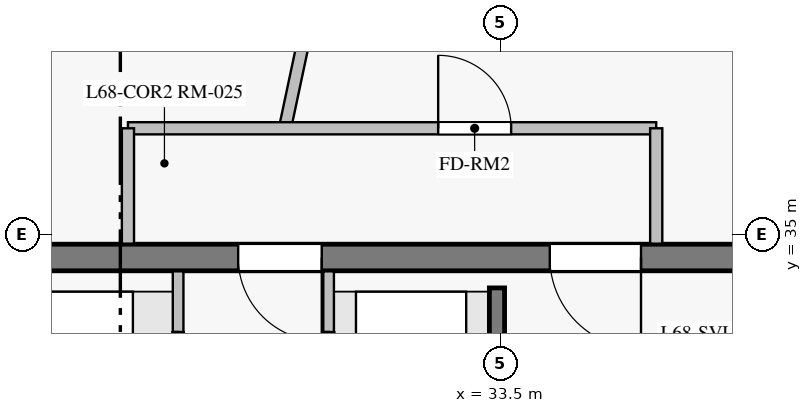
"""IFC4 building model, lengths in metres.
Left out: names, types, materials, properties, quantities, classifications, styles, units other than length and angle.
Written with IfcOpenShell. Run it as: python <this file> out.ifc"""

import sys

from ifc_helpers import new_model, si_unit, direction, frame, frame_2d, origin, origin_with_axes, place, context, subcontext, project, spatial, rectangle, extrude, source, transform, mapped, element, fill, save


model = new_model("IFC4")
c1 = context("Model", 3, precision=1e-05, world=origin(), true_north=direction((0.0, 1.0)))
c2 = subcontext(c1, "Body", "Model", "MODEL_VIEW")
j1 = project(units=[si_unit("LENGTHUNIT", "METRE"), si_unit("PLANEANGLEUNIT", "RADIAN")], contexts=[c1])
p1 = place(None, origin())
s1 = spatial("IfcSite", under=j1, at=p1, CompositionType="ELEMENT")
p2 = place(p1, origin())
s2 = spatial("IfcBuilding", under=s1, at=p2, CompositionType="ELEMENT")
p3 = place(p2, frame((0.0, 0.0, 232.15)))
s3 = spatial("IfcBuildingStorey", under=s2, at=p3, CompositionType="ELEMENT", Elevation=232.15)
p4 = place(p3, frame((37.5, 34.7, 0.0), z_axis=(0.0, 0.0, 1.0), x_axis=(-1.0, 0.0, 0.0)))
e1 = element("IfcWall", 1, at=p4, inside=s3, PredefinedType="SHEAR", context=c2, shape_type="SweptSolid", body=[
    extrude(rectangle(XDim=10.95, YDim=0.35, at=frame_2d((5.475, 0.0))), origin(), (0.0, 0.0, 1.0), 2.85),
])
p5 = place(p4, frame((2.15, 0.0, 0.0)))
e2 = element("IfcOpeningElement", 2, at=p5, cuts=e1, PredefinedType="OPENING", context=c2, shape_type="SweptSolid", body=[
    extrude(rectangle(XDim=1.2, YDim=2.15, at=frame_2d((0.6, 1.075))), frame((0.0, 0.185, 0.0), z_axis=(0.0, -1.0, 0.0), x_axis=(1.0, 0.0, 0.0)), (0.0, 0.0, 1.0), 0.37),
])
p6 = place(p4, frame((6.35, 0.0, 0.0)))
e3 = element("IfcOpeningElement", 3, at=p6, cuts=e1, PredefinedType="OPENING", context=c2, shape_type="SweptSolid", body=[
    extrude(rectangle(XDim=1.1, YDim=2.15, at=frame_2d((0.55, 1.075))), frame((0.0, 0.185, 0.0), z_axis=(0.0, -1.0, 0.0), x_axis=(1.0, 0.0, 0.0)), (0.0, 0.0, 1.0), 0.37),
])
p7 = place(p3, frame((33.455, 18.7, 0.0), z_axis=(0.0, 0.0, 1.0), x_axis=(0.0, 1.0, 0.0)))
e4 = element("IfcWall", 4, at=p7, inside=s3, PredefinedType="SHEAR", context=c2, shape_type="SweptSolid", body=[
    extrude(rectangle(XDim=15.6, YDim=0.2, at=frame_2d((7.8, 0.0))), origin(), (0.0, 0.0, 1.0), 2.85),
])
p8 = place(p7, frame((2.75, 0.0, 0.0)))
e5 = element("IfcOpeningElement", 5, at=p8, cuts=e4, PredefinedType="OPENING", context=c2, shape_type="SweptSolid", body=[
    extrude(rectangle(XDim=1.15, YDim=2.15, at=frame_2d((0.575, 1.075))), frame((0.0, 0.11, 0.0), z_axis=(0.0, -1.0, 0.0), x_axis=(1.0, 0.0, 0.0)), (0.0, 0.0, 1.0), 0.22),
])
p9 = place(p7, frame((0.55, 0.0, 0.0)))
e6 = element("IfcOpeningElement", 6, at=p9, cuts=e4, PredefinedType="OPENING", context=c2, shape_type="SweptSolid", body=[
    extrude(rectangle(XDim=0.94, YDim=2.1, at=frame_2d((0.47, 1.05))), frame((0.0, 0.11, 0.0), z_axis=(0.0, -1.0, 0.0), x_axis=(1.0, 0.0, 0.0)), (0.0, 0.0, 1.0), 0.22),
])
p10 = place(p3, frame((30.659, 36.371, 0.0), z_axis=(0.0, 0.0, 1.0), x_axis=(0.207907775763, 0.978148432896, 0.0)))
e7 = element("IfcWall", 7, at=p10, inside=s3, PredefinedType="PARTITIONING", context=c2, shape_type="SweptSolid", body=[
    extrude(rectangle(XDim=10.841, YDim=0.16, at=frame_2d((5.42, 0.0))), origin(), (0.0, 0.0, 1.0), 2.85),
])
p11 = place(p3, frame((28.6, 36.4, 0.0), z_axis=(0.0, 0.0, 1.0), x_axis=(1.0, 0.0, 0.0)))
e8 = element("IfcWall", 8, at=p11, inside=s3, PredefinedType="PARTITIONING", context=c2, shape_type="SweptSolid", body=[
    extrude(rectangle(XDim=6.95, YDim=0.16, at=frame_2d((3.475, 0.0))), origin(), (0.0, 0.0, 1.0), 2.45),
])
p12 = place(p11, frame((4.081, 0.0, 0.0)))
e9 = element("IfcOpeningElement", 9, at=p12, cuts=e8, PredefinedType="OPENING", context=c2, shape_type="SweptSolid", body=[
    extrude(rectangle(XDim=0.96, YDim=2.15, at=frame_2d((0.48, 1.075))), frame((0.0, 0.09, 0.0), z_axis=(0.0, -1.0, 0.0), x_axis=(1.0, 0.0, 0.0)), (0.0, 0.0, 1.0), 0.18),
])
p13 = place(p3, frame((29.26, 30.45, 0.0), z_axis=(0.0, 0.0, 1.0), x_axis=(0.0, 1.0, 0.0)))
e10 = element("IfcWall", 10, at=p13, inside=s3, PredefinedType="PARTITIONING", context=c2, shape_type="SweptSolid", body=[
    extrude(rectangle(XDim=4.068, YDim=0.14, at=frame_2d((2.034, 0.0))), origin(), (0.0, 0.0, 1.0), 2.85),
])
p14 = place(p13, frame((0.35, 0.0, 0.0)))
e11 = element("IfcOpeningElement", 11, at=p14, cuts=e10, PredefinedType="OPENING", context=c2, shape_type="SweptSolid", body=[
    extrude(rectangle(XDim=1.02, YDim=2.15, at=frame_2d((0.51, 1.075))), frame((0.0, 0.08, 0.0), z_axis=(0.0, -1.0, 0.0), x_axis=(1.0, 0.0, 0.0)), (0.0, 0.0, 1.0), 0.16),
])
p15 = place(p13, frame((2.25, 0.0, 0.0)))
e12 = element("IfcOpeningElement", 12, at=p15, cuts=e10, PredefinedType="OPENING", context=c2, shape_type="SweptSolid", body=[
    extrude(rectangle(XDim=1.02, YDim=2.15, at=frame_2d((0.51, 1.075))), frame((0.0, 0.08, 0.0), z_axis=(0.0, -1.0, 0.0), x_axis=(1.0, 0.0, 0.0)), (0.0, 0.0, 1.0), 0.16),
])
p16 = place(p3, frame((31.24, 30.45, 0.0), z_axis=(0.0, 0.0, 1.0), x_axis=(0.0, 1.0, 0.0)))
e13 = element("IfcWall", 13, at=p16, inside=s3, PredefinedType="PARTITIONING", context=c2, shape_type="SweptSolid", body=[
    extrude(rectangle(XDim=4.068, YDim=0.14, at=frame_2d((2.034, 0.0))), origin(), (0.0, 0.0, 1.0), 2.85),
])
p17 = place(p16, frame((0.35, 0.0, 0.0)))
e14 = element("IfcOpeningElement", 14, at=p17, cuts=e13, PredefinedType="OPENING", context=c2, shape_type="SweptSolid", body=[
    extrude(rectangle(XDim=1.02, YDim=2.15, at=frame_2d((0.51, 1.075))), frame((0.0, 0.08, 0.0), z_axis=(0.0, -1.0, 0.0), x_axis=(1.0, 0.0, 0.0)), (0.0, 0.0, 1.0), 0.16),
])
p18 = place(p16, frame((2.25, 0.0, 0.0)))
e15 = element("IfcOpeningElement", 15, at=p18, cuts=e13, PredefinedType="OPENING", context=c2, shape_type="SweptSolid", body=[
    extrude(rectangle(XDim=1.02, YDim=2.15, at=frame_2d((0.51, 1.075))), frame((0.0, 0.08, 0.0), z_axis=(0.0, -1.0, 0.0), x_axis=(1.0, 0.0, 0.0)), (0.0, 0.0, 1.0), 0.16),
])
for number, where, z_axis, x_axis in (
    (16, (28.6, 34.882, 0.0), (0.0, 0.0, 1.0), (0.0, 1.0, 0.0)),
    (17, (35.55, 36.4, 0.0), (0.0, 0.0, 1.0), (0.0, -1.0, 0.0)),
):
    element("IfcWall", number, at=place(p3, frame(where, z_axis=z_axis, x_axis=x_axis)), inside=s3, PredefinedType="PARTITIONING", context=c2, shape_type="SweptSolid", body=[
        extrude(rectangle(XDim=1.518, YDim=0.16, at=frame_2d((0.759, 0.0))), origin(), (0.0, 0.0, 1.0), 2.85),
    ])
m1 = source(origin_with_axes(), c2, "Body", "SweptSolid", [
    extrude(rectangle(XDim=1.2, YDim=2.15, at=frame_2d((0.6, 1.075))), frame((0.0, 0.025, 0.0), z_axis=(0.0, -1.0, 0.0), x_axis=(1.0, 0.0, 0.0)), (0.0, 0.0, 1.0), 0.05),
])
p19 = place(p5, origin())
e18 = element("IfcDoor", 18, at=p19, inside=s3, OperationType="SINGLE_SWING_LEFT", PredefinedType="DOOR", context=c2, shape_type="MappedRepresentation", body=[
    mapped(m1, transform((0.0, 0.0, 0.0), scale=1.0)),
])
fill(e2, e18)
m2 = source(origin_with_axes(), c2, "Body", "SweptSolid", [
    extrude(rectangle(XDim=1.1, YDim=2.15, at=frame_2d((0.55, 1.075))), frame((0.0, 0.025, 0.0), z_axis=(0.0, -1.0, 0.0), x_axis=(1.0, 0.0, 0.0)), (0.0, 0.0, 1.0), 0.05),
])
p20 = place(p6, origin())
e19 = element("IfcDoor", 19, at=p20, inside=s3, OperationType="SINGLE_SWING_LEFT", PredefinedType="DOOR", context=c2, shape_type="MappedRepresentation", body=[
    mapped(m2, transform((0.0, 0.0, 0.0), scale=1.0)),
])
fill(e3, e19)
m3 = source(origin_with_axes(), c2, "Body", "SweptSolid", [
    extrude(rectangle(XDim=1.02, YDim=2.15, at=frame_2d((0.51, 1.075))), frame((0.0, 0.025, 0.0), z_axis=(0.0, -1.0, 0.0), x_axis=(1.0, 0.0, 0.0)), (0.0, 0.0, 1.0), 0.05),
])
p21 = place(p15, origin())
e20 = element("IfcDoor", 20, at=p21, inside=s3, OperationType="SLIDING_TO_LEFT", PredefinedType="DOOR", context=c2, shape_type="MappedRepresentation", body=[
    mapped(m3, transform((0.0, 0.0, 0.0), scale=1.0)),
])
fill(e12, e20)
p22 = place(p18, origin())
e21 = element("IfcDoor", 21, at=p22, inside=s3, OperationType="SLIDING_TO_LEFT", PredefinedType="DOOR", context=c2, shape_type="MappedRepresentation", body=[
    mapped(m3, transform((0.0, 0.0, 0.0), scale=1.0)),
])
fill(e15, e21)
m4 = source(origin_with_axes(), c2, "Body", "SweptSolid", [
    extrude(rectangle(XDim=0.96, YDim=2.15, at=frame_2d((0.48, 1.075))), frame((0.0, 0.025, 0.0), z_axis=(0.0, -1.0, 0.0), x_axis=(1.0, 0.0, 0.0)), (0.0, 0.0, 1.0), 0.05),
])
p23 = place(p12, origin())
e22 = element("IfcDoor", 22, at=p23, inside=s3, OperationType="SINGLE_SWING_LEFT", PredefinedType="DOOR", context=c2, shape_type="MappedRepresentation", body=[
    mapped(m4, transform((0.0, 0.0, 0.0), scale=1.0)),
])
fill(e9, e22)
save(model, sys.argv[1])
